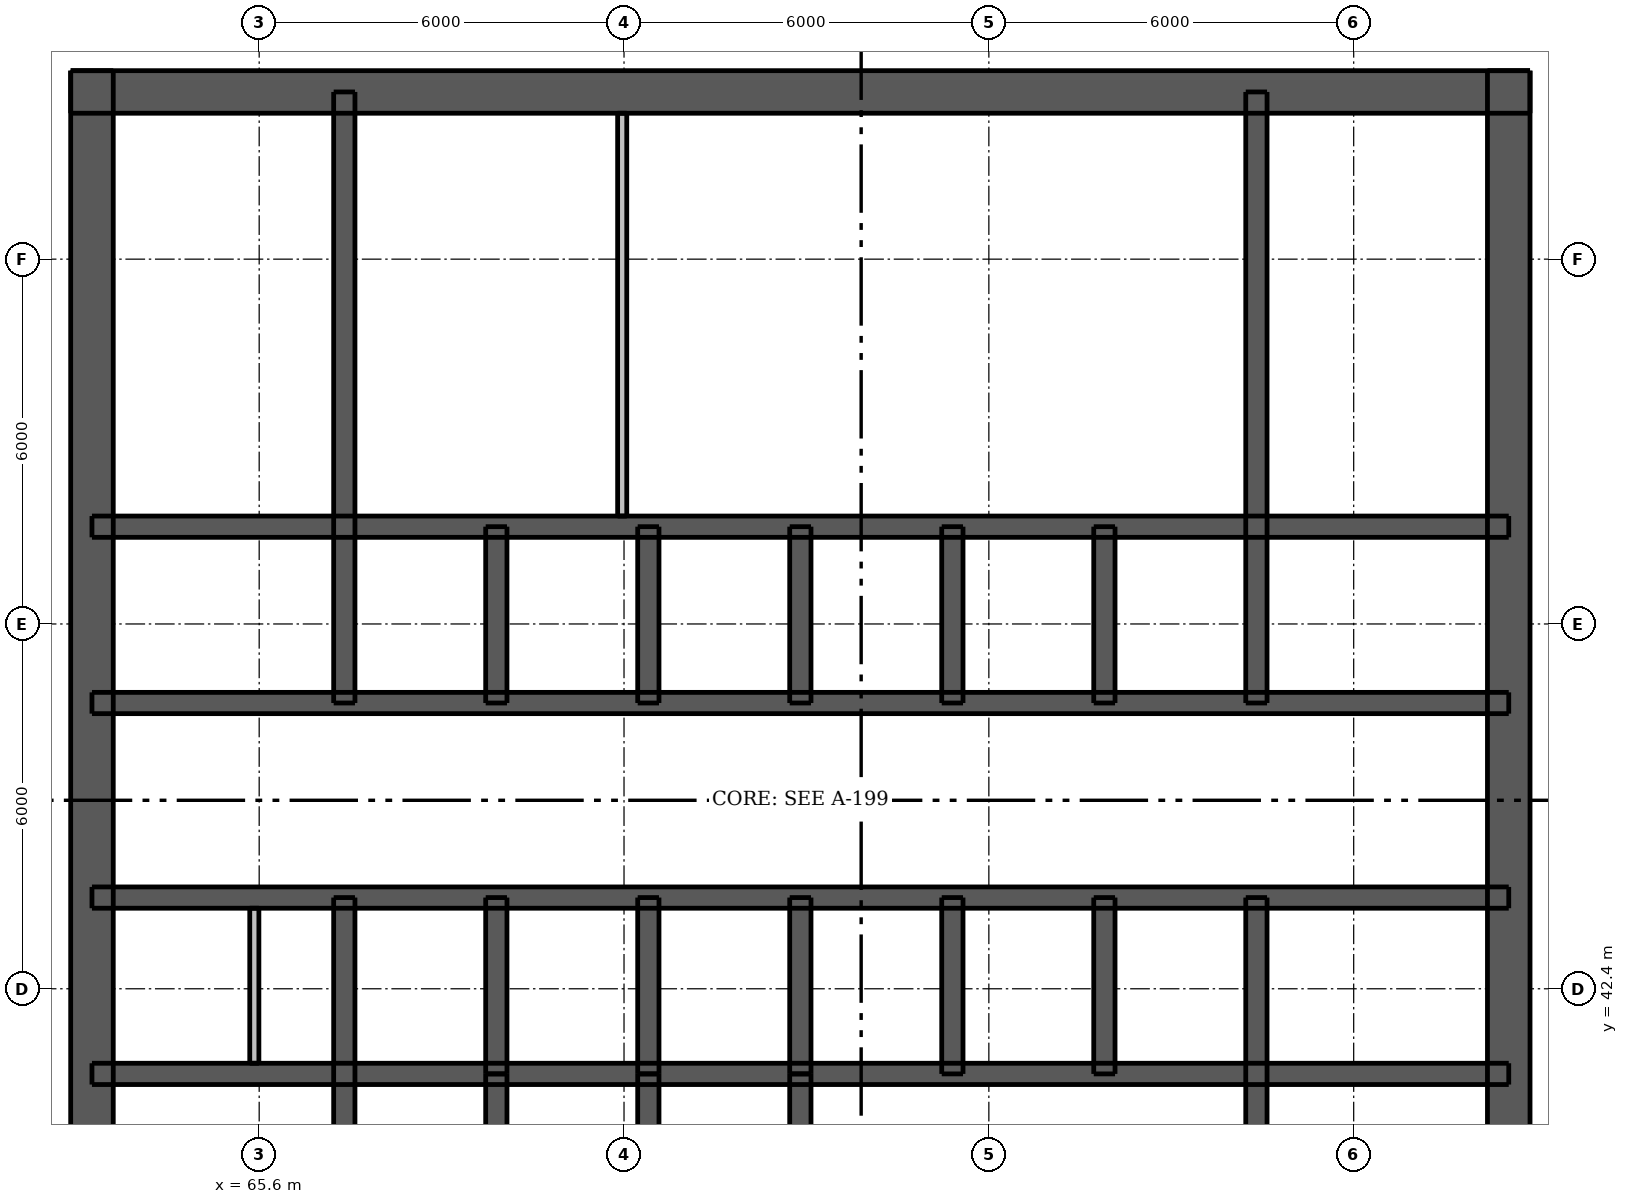
"""IFC4 building model, lengths in metres.
Left out: names, types, materials, properties, quantities, classifications, styles, units other than length and angle.
Written with IfcOpenShell. Run it as: python <this file> out.ifc"""

import sys

from ifc_helpers import new_model, si_unit, direction, frame, frame_2d, origin, place, context, subcontext, project, spatial, rectangle, extrude, element, fill, save


model = new_model("IFC4")
c1 = context("Model", 3, precision=1e-05, world=origin(), true_north=direction((0.0, 1.0)))
c2 = subcontext(c1, "Body", "Model", "MODEL_VIEW")
j1 = project(units=[si_unit("LENGTHUNIT", "METRE"), si_unit("PLANEANGLEUNIT", "RADIAN")], contexts=[c1])
p1 = place(None, origin())
s1 = spatial("IfcSite", under=j1, at=p1, CompositionType="ELEMENT")
p2 = place(p1, origin())
s2 = spatial("IfcBuilding", under=s1, at=p2, CompositionType="ELEMENT")
p3 = place(p2, frame((0.0, 0.0, 137.2)))
s3 = spatial("IfcBuildingStorey", under=s2, at=p3, CompositionType="ELEMENT", Elevation=137.2)
p4 = place(p3, frame((62.5, 57.15, 0.0), z_axis=(0.0, 0.0, 1.0), x_axis=(1.0, 0.0, 0.0)))
e1 = element("IfcWall", 1, at=p4, inside=s3, PredefinedType="SHEAR", context=c2, shape_type="SweptSolid", body=[
    extrude(rectangle(XDim=24.0, YDim=0.7, at=frame_2d((12.0, 0.0))), origin(), (0.0, 0.0, 1.0), 3.05),
])
p5 = place(p4, frame((20.938, 0.0, 0.0)))
e2 = element("IfcOpeningElement", 2, at=p5, cuts=e1, PredefinedType="OPENING", context=c2, shape_type="SweptSolid", body=[
    extrude(rectangle(XDim=1.1, YDim=2.1, at=frame_2d((0.55, 1.05))), frame((0.0, 0.36, 0.0), z_axis=(0.0, -1.0, 0.0), x_axis=(1.0, 0.0, 0.0)), (0.0, 0.0, 1.0), 0.72),
])
p6 = place(p4, frame((1.962, 0.0, 0.0)))
e3 = element("IfcOpeningElement", 3, at=p6, cuts=e1, PredefinedType="OPENING", context=c2, shape_type="SweptSolid", body=[
    extrude(rectangle(XDim=1.1, YDim=2.1, at=frame_2d((0.55, 1.05))), frame((0.0, 0.36, 0.0), z_axis=(0.0, -1.0, 0.0), x_axis=(1.0, 0.0, 0.0)), (0.0, 0.0, 1.0), 0.72),
])
p7 = place(p4, frame((6.423, 0.0, 0.0)))
e4 = element("IfcOpeningElement", 4, at=p7, cuts=e1, PredefinedType="OPENING", context=c2, shape_type="SweptSolid", body=[
    extrude(rectangle(XDim=0.9, YDim=2.1, at=frame_2d((0.45, 1.05))), frame((0.0, 0.36, 0.0), z_axis=(0.0, -1.0, 0.0), x_axis=(1.0, 0.0, 0.0)), (0.0, 0.0, 1.0), 0.72),
])
p8 = place(p4, frame((13.748, 0.0, 0.0)))
e5 = element("IfcOpeningElement", 5, at=p8, cuts=e1, PredefinedType="OPENING", context=c2, shape_type="SweptSolid", body=[
    extrude(rectangle(XDim=0.9, YDim=2.1, at=frame_2d((0.45, 1.05))), frame((0.0, 0.36, 0.0), z_axis=(0.0, -1.0, 0.0), x_axis=(1.0, 0.0, 0.0)), (0.0, 0.0, 1.0), 0.72),
])
p9 = place(p3, frame((62.85, 33.5, 0.0), z_axis=(0.0, 0.0, 1.0), x_axis=(0.0, 1.0, 0.0)))
e6 = element("IfcWall", 6, at=p9, inside=s3, PredefinedType="SHEAR", context=c2, shape_type="SweptSolid", body=[
    extrude(rectangle(XDim=24.0, YDim=0.7, at=frame_2d((12.0, 0.0))), origin(), (0.0, 0.0, 1.0), 3.05),
])
p10 = place(p9, frame((11.2, 0.0, 0.0)))
e7 = element("IfcOpeningElement", 7, at=p10, cuts=e6, PredefinedType="OPENING", context=c2, shape_type="SweptSolid", body=[
    extrude(rectangle(XDim=1.6, YDim=2.1, at=frame_2d((0.8, 1.05))), frame((0.0, 0.36, 0.0), z_axis=(0.0, -1.0, 0.0), x_axis=(1.0, 0.0, 0.0)), (0.0, 0.0, 1.0), 0.72),
])
p11 = place(p3, frame((86.15, 33.5, 0.0), z_axis=(0.0, 0.0, 1.0), x_axis=(0.0, 1.0, 0.0)))
e8 = element("IfcWall", 8, at=p11, inside=s3, PredefinedType="SHEAR", context=c2, shape_type="SweptSolid", body=[
    extrude(rectangle(XDim=24.0, YDim=0.7, at=frame_2d((12.0, 0.0))), origin(), (0.0, 0.0, 1.0), 3.05),
])
p12 = place(p11, frame((11.2, 0.0, 0.0)))
e9 = element("IfcOpeningElement", 9, at=p12, cuts=e8, PredefinedType="OPENING", context=c2, shape_type="SweptSolid", body=[
    extrude(rectangle(XDim=1.6, YDim=2.1, at=frame_2d((0.8, 1.05))), frame((0.0, 0.36, 0.0), z_axis=(0.0, -1.0, 0.0), x_axis=(1.0, 0.0, 0.0)), (0.0, 0.0, 1.0), 0.72),
])
p13 = place(p3, frame((62.85, 41.0, 0.0), z_axis=(0.0, 0.0, 1.0), x_axis=(1.0, 0.0, 0.0)))
e10 = element("IfcWall", 10, at=p13, inside=s3, PredefinedType="SHEAR", context=c2, shape_type="SweptSolid", body=[
    extrude(rectangle(XDim=23.3, YDim=0.35, at=frame_2d((11.65, 0.0))), origin(), (0.0, 0.0, 1.0), 3.05),
])
p14 = place(p3, frame((62.85, 43.9, 0.0), z_axis=(0.0, 0.0, 1.0), x_axis=(1.0, 0.0, 0.0)))
e11 = element("IfcWall", 11, at=p14, inside=s3, PredefinedType="SHEAR", context=c2, shape_type="SweptSolid", body=[
    extrude(rectangle(XDim=23.3, YDim=0.35, at=frame_2d((11.65, 0.0))), origin(), (0.0, 0.0, 1.0), 3.05),
])
p15 = place(p14, frame((1.06, 0.0, 0.0)))
e12 = element("IfcOpeningElement", 12, at=p15, cuts=e11, PredefinedType="OPENING", context=c2, shape_type="SweptSolid", body=[
    extrude(rectangle(XDim=0.9, YDim=2.1, at=frame_2d((0.45, 1.05))), frame((0.0, 0.185, 0.0), z_axis=(0.0, -1.0, 0.0), x_axis=(1.0, 0.0, 0.0)), (0.0, 0.0, 1.0), 0.37),
])
p16 = place(p14, frame((2.923, 0.0, 0.0)))
e13 = element("IfcOpeningElement", 13, at=p16, cuts=e11, PredefinedType="OPENING", context=c2, shape_type="SweptSolid", body=[
    extrude(rectangle(XDim=0.8, YDim=2.1, at=frame_2d((0.4, 1.05))), frame((0.0, 0.185, 0.0), z_axis=(0.0, -1.0, 0.0), x_axis=(1.0, 0.0, 0.0)), (0.0, 0.0, 1.0), 0.37),
])
p17 = place(p14, frame((20.688, 0.0, 0.0)))
e14 = element("IfcOpeningElement", 14, at=p17, cuts=e11, PredefinedType="OPENING", context=c2, shape_type="SweptSolid", body=[
    extrude(rectangle(XDim=0.9, YDim=2.1, at=frame_2d((0.45, 1.05))), frame((0.0, 0.185, 0.0), z_axis=(0.0, -1.0, 0.0), x_axis=(1.0, 0.0, 0.0)), (0.0, 0.0, 1.0), 0.37),
])
p18 = place(p14, frame((4.85, 0.0, 0.0)))
e15 = element("IfcOpeningElement", 15, at=p18, cuts=e11, PredefinedType="OPENING", context=c2, shape_type="SweptSolid", body=[
    extrude(rectangle(XDim=1.1, YDim=2.1, at=frame_2d((0.55, 1.05))), frame((0.0, 0.185, 0.0), z_axis=(0.0, -1.0, 0.0), x_axis=(1.0, 0.0, 0.0)), (0.0, 0.0, 1.0), 0.37),
])
p19 = place(p14, frame((7.35, 0.0, 0.0)))
e16 = element("IfcOpeningElement", 16, at=p19, cuts=e11, PredefinedType="OPENING", context=c2, shape_type="SweptSolid", body=[
    extrude(rectangle(XDim=1.1, YDim=2.1, at=frame_2d((0.55, 1.05))), frame((0.0, 0.185, 0.0), z_axis=(0.0, -1.0, 0.0), x_axis=(1.0, 0.0, 0.0)), (0.0, 0.0, 1.0), 0.37),
])
p20 = place(p14, frame((9.85, 0.0, 0.0)))
e17 = element("IfcOpeningElement", 17, at=p20, cuts=e11, PredefinedType="OPENING", context=c2, shape_type="SweptSolid", body=[
    extrude(rectangle(XDim=1.1, YDim=2.1, at=frame_2d((0.55, 1.05))), frame((0.0, 0.185, 0.0), z_axis=(0.0, -1.0, 0.0), x_axis=(1.0, 0.0, 0.0)), (0.0, 0.0, 1.0), 0.37),
])
p21 = place(p14, frame((12.35, 0.0, 0.0)))
e18 = element("IfcOpeningElement", 18, at=p21, cuts=e11, PredefinedType="OPENING", context=c2, shape_type="SweptSolid", body=[
    extrude(rectangle(XDim=1.1, YDim=2.1, at=frame_2d((0.55, 1.05))), frame((0.0, 0.185, 0.0), z_axis=(0.0, -1.0, 0.0), x_axis=(1.0, 0.0, 0.0)), (0.0, 0.0, 1.0), 0.37),
])
p22 = place(p14, frame((14.85, 0.0, 0.0)))
e19 = element("IfcOpeningElement", 19, at=p22, cuts=e11, PredefinedType="OPENING", context=c2, shape_type="SweptSolid", body=[
    extrude(rectangle(XDim=1.1, YDim=2.1, at=frame_2d((0.55, 1.05))), frame((0.0, 0.185, 0.0), z_axis=(0.0, -1.0, 0.0), x_axis=(1.0, 0.0, 0.0)), (0.0, 0.0, 1.0), 0.37),
])
p23 = place(p14, frame((17.35, 0.0, 0.0)))
e20 = element("IfcOpeningElement", 20, at=p23, cuts=e11, PredefinedType="OPENING", context=c2, shape_type="SweptSolid", body=[
    extrude(rectangle(XDim=1.1, YDim=2.1, at=frame_2d((0.55, 1.05))), frame((0.0, 0.185, 0.0), z_axis=(0.0, -1.0, 0.0), x_axis=(1.0, 0.0, 0.0)), (0.0, 0.0, 1.0), 0.37),
])
p24 = place(p3, frame((62.85, 47.1, 0.0), z_axis=(0.0, 0.0, 1.0), x_axis=(1.0, 0.0, 0.0)))
e21 = element("IfcWall", 21, at=p24, inside=s3, PredefinedType="SHEAR", context=c2, shape_type="SweptSolid", body=[
    extrude(rectangle(XDim=23.3, YDim=0.35, at=frame_2d((11.65, 0.0))), origin(), (0.0, 0.0, 1.0), 3.05),
])
p25 = place(p24, frame((1.712, 0.0, 0.0)))
e22 = element("IfcOpeningElement", 22, at=p25, cuts=e21, PredefinedType="OPENING", context=c2, shape_type="SweptSolid", body=[
    extrude(rectangle(XDim=0.9, YDim=2.1, at=frame_2d((0.45, 1.05))), frame((0.0, 0.185, 0.0), z_axis=(0.0, -1.0, 0.0), x_axis=(1.0, 0.0, 0.0)), (0.0, 0.0, 1.0), 0.37),
])
p26 = place(p24, frame((20.688, 0.0, 0.0)))
e23 = element("IfcOpeningElement", 23, at=p26, cuts=e21, PredefinedType="OPENING", context=c2, shape_type="SweptSolid", body=[
    extrude(rectangle(XDim=0.9, YDim=2.1, at=frame_2d((0.45, 1.05))), frame((0.0, 0.185, 0.0), z_axis=(0.0, -1.0, 0.0), x_axis=(1.0, 0.0, 0.0)), (0.0, 0.0, 1.0), 0.37),
])
p27 = place(p3, frame((62.85, 50.0, 0.0), z_axis=(0.0, 0.0, 1.0), x_axis=(1.0, 0.0, 0.0)))
e24 = element("IfcWall", 24, at=p27, inside=s3, PredefinedType="SHEAR", context=c2, shape_type="SweptSolid", body=[
    extrude(rectangle(XDim=23.3, YDim=0.35, at=frame_2d((11.65, 0.0))), origin(), (0.0, 0.0, 1.0), 3.05),
])
p28 = place(p3, frame((67.0, 33.85, 0.0), z_axis=(0.0, 0.0, 1.0), x_axis=(0.0, 1.0, 0.0)))
e25 = element("IfcWall", 25, at=p28, inside=s3, PredefinedType="SHEAR", context=c2, shape_type="SweptSolid", body=[
    extrude(rectangle(XDim=10.05, YDim=0.35, at=frame_2d((5.025, 0.0))), origin(), (0.0, 0.0, 1.0), 3.05),
])
p29 = place(p28, frame((0.55, 0.0, 0.0)))
e26 = element("IfcOpeningElement", 26, at=p29, cuts=e25, PredefinedType="OPENING", context=c2, shape_type="SweptSolid", body=[
    extrude(rectangle(XDim=1.1, YDim=2.1, at=frame_2d((0.55, 1.05))), frame((0.0, 0.185, 0.0), z_axis=(0.0, -1.0, 0.0), x_axis=(1.0, 0.0, 0.0)), (0.0, 0.0, 1.0), 0.37),
])
for number, where, z_axis, x_axis in (
    (27, (67.0, 47.1, 0.0), (0.0, 0.0, 1.0), (0.0, 1.0, 0.0)),
    (28, (82.0, 33.85, 0.0), (0.0, 0.0, 1.0), (0.0, 1.0, 0.0)),
    (29, (82.0, 47.1, 0.0), (0.0, 0.0, 1.0), (0.0, 1.0, 0.0)),
):
    element("IfcWall", number, at=place(p3, frame(where, z_axis=z_axis, x_axis=x_axis)), inside=s3, PredefinedType="SHEAR", context=c2, shape_type="SweptSolid", body=[
        extrude(rectangle(XDim=10.05, YDim=0.35, at=frame_2d((5.025, 0.0))), origin(), (0.0, 0.0, 1.0), 3.05),
    ])
for number, where, z_axis, x_axis in (
    (30, (69.5, 41.0, 0.0), (0.0, 0.0, 1.0), (0.0, 1.0, 0.0)),
    (31, (69.5, 47.1, 0.0), (0.0, 0.0, 1.0), (0.0, 1.0, 0.0)),
    (32, (72.0, 41.0, 0.0), (0.0, 0.0, 1.0), (0.0, 1.0, 0.0)),
    (33, (72.0, 47.1, 0.0), (0.0, 0.0, 1.0), (0.0, 1.0, 0.0)),
    (34, (74.5, 41.0, 0.0), (0.0, 0.0, 1.0), (0.0, 1.0, 0.0)),
    (35, (74.5, 47.1, 0.0), (0.0, 0.0, 1.0), (0.0, 1.0, 0.0)),
    (36, (77.0, 41.0, 0.0), (0.0, 0.0, 1.0), (0.0, 1.0, 0.0)),
    (37, (77.0, 47.1, 0.0), (0.0, 0.0, 1.0), (0.0, 1.0, 0.0)),
    (38, (79.5, 41.0, 0.0), (0.0, 0.0, 1.0), (0.0, 1.0, 0.0)),
    (39, (79.5, 47.1, 0.0), (0.0, 0.0, 1.0), (0.0, 1.0, 0.0)),
    (40, (69.5, 38.1, 0.0), (0.0, 0.0, 1.0), (0.0, 1.0, 0.0)),
    (41, (72.0, 38.1, 0.0), (0.0, 0.0, 1.0), (0.0, 1.0, 0.0)),
    (42, (74.5, 38.1, 0.0), (0.0, 0.0, 1.0), (0.0, 1.0, 0.0)),
):
    element("IfcWall", number, at=place(p3, frame(where, z_axis=z_axis, x_axis=x_axis)), inside=s3, PredefinedType="SHEAR", context=c2, shape_type="SweptSolid", body=[
        extrude(rectangle(XDim=2.9, YDim=0.35, at=frame_2d((1.45, 0.0))), origin(), (0.0, 0.0, 1.0), 3.05),
    ])
p30 = place(p3, frame((65.52, 41.175, 0.0), z_axis=(0.0, 0.0, 1.0), x_axis=(0.0, 1.0, 0.0)))
e43 = element("IfcWall", 43, at=p30, inside=s3, PredefinedType="PLUMBINGWALL", context=c2, shape_type="SweptSolid", body=[
    extrude(rectangle(XDim=2.55, YDim=0.15, at=frame_2d((1.275, 0.0))), origin(), (0.0, 0.0, 1.0), 3.05),
])
p31 = place(p3, frame((71.57, 50.175, 0.0), z_axis=(0.0, 0.0, 1.0), x_axis=(0.0, 1.0, 0.0)))
e44 = element("IfcWall", 44, at=p31, inside=s3, PredefinedType="PLUMBINGWALL", context=c2, shape_type="SweptSolid", body=[
    extrude(rectangle(XDim=6.625, YDim=0.15, at=frame_2d((3.312, 0.0))), origin(), (0.0, 0.0, 1.0), 3.05),
])
p32 = place(p5, origin())
e45 = element("IfcDoor", 45, at=p32, inside=s3, OperationType="SINGLE_SWING_RIGHT", PredefinedType="DOOR", context=c2, shape_type="SweptSolid", body=[
    extrude(rectangle(XDim=1.1, YDim=2.1, at=frame_2d((0.55, 1.05))), frame((0.0, -0.288, 0.0), z_axis=(0.0, -1.0, 0.0), x_axis=(1.0, 0.0, 0.0)), (0.0, 0.0, 1.0), 0.05),
])
fill(e2, e45)
p33 = place(p6, origin())
e46 = element("IfcDoor", 46, at=p33, inside=s3, OperationType="SINGLE_SWING_LEFT", PredefinedType="DOOR", context=c2, shape_type="SweptSolid", body=[
    extrude(rectangle(XDim=1.1, YDim=2.1, at=frame_2d((0.55, 1.05))), frame((0.0, -0.288, 0.0), z_axis=(0.0, -1.0, 0.0), x_axis=(1.0, 0.0, 0.0)), (0.0, 0.0, 1.0), 0.05),
])
fill(e3, e46)
p34 = place(p10, origin())
e47 = element("IfcDoor", 47, at=p34, inside=s3, OperationType="DOUBLE_DOOR_SINGLE_SWING", PredefinedType="DOOR", context=c2, shape_type="SweptSolid", body=[
    extrude(rectangle(XDim=1.6, YDim=2.1, at=frame_2d((0.8, 1.05))), frame((0.0, -0.288, 0.0), z_axis=(0.0, -1.0, 0.0), x_axis=(1.0, 0.0, 0.0)), (0.0, 0.0, 1.0), 0.05),
])
fill(e7, e47)
p35 = place(p12, origin())
e48 = element("IfcDoor", 48, at=p35, inside=s3, OperationType="DOUBLE_DOOR_SINGLE_SWING", PredefinedType="DOOR", context=c2, shape_type="SweptSolid", body=[
    extrude(rectangle(XDim=1.6, YDim=2.1, at=frame_2d((0.8, 1.05))), frame((0.0, 0.337, 0.0), z_axis=(0.0, -1.0, 0.0), x_axis=(1.0, 0.0, 0.0)), (0.0, 0.0, 1.0), 0.05),
])
fill(e9, e48)
p36 = place(p15, origin())
e49 = element("IfcDoor", 49, at=p36, inside=s3, OperationType="SINGLE_SWING_LEFT", PredefinedType="DOOR", context=c2, shape_type="SweptSolid", body=[
    extrude(rectangle(XDim=0.9, YDim=2.1, at=frame_2d((0.45, 1.05))), frame((0.0, -0.112, 0.0), z_axis=(0.0, -1.0, 0.0), x_axis=(1.0, 0.0, 0.0)), (0.0, 0.0, 1.0), 0.05),
])
fill(e12, e49)
p37 = place(p16, origin())
e50 = element("IfcDoor", 50, at=p37, inside=s3, OperationType="SINGLE_SWING_RIGHT", PredefinedType="DOOR", context=c2, shape_type="SweptSolid", body=[
    extrude(rectangle(XDim=0.8, YDim=2.1, at=frame_2d((0.4, 1.05))), frame((0.0, -0.112, 0.0), z_axis=(0.0, -1.0, 0.0), x_axis=(1.0, 0.0, 0.0)), (0.0, 0.0, 1.0), 0.05),
])
fill(e13, e50)
p38 = place(p17, origin())
e51 = element("IfcDoor", 51, at=p38, inside=s3, OperationType="SINGLE_SWING_LEFT", PredefinedType="DOOR", context=c2, shape_type="SweptSolid", body=[
    extrude(rectangle(XDim=0.9, YDim=2.1, at=frame_2d((0.45, 1.05))), frame((0.0, -0.112, 0.0), z_axis=(0.0, -1.0, 0.0), x_axis=(1.0, 0.0, 0.0)), (0.0, 0.0, 1.0), 0.05),
])
fill(e14, e51)
p39 = place(p25, origin())
e52 = element("IfcDoor", 52, at=p39, inside=s3, OperationType="SINGLE_SWING_LEFT", PredefinedType="DOOR", context=c2, shape_type="SweptSolid", body=[
    extrude(rectangle(XDim=0.9, YDim=2.1, at=frame_2d((0.45, 1.05))), frame((0.0, 0.163, 0.0), z_axis=(0.0, -1.0, 0.0), x_axis=(1.0, 0.0, 0.0)), (0.0, 0.0, 1.0), 0.05),
])
fill(e22, e52)
p40 = place(p26, origin())
e53 = element("IfcDoor", 53, at=p40, inside=s3, OperationType="SINGLE_SWING_LEFT", PredefinedType="DOOR", context=c2, shape_type="SweptSolid", body=[
    extrude(rectangle(XDim=0.9, YDim=2.1, at=frame_2d((0.45, 1.05))), frame((0.0, 0.163, 0.0), z_axis=(0.0, -1.0, 0.0), x_axis=(1.0, 0.0, 0.0)), (0.0, 0.0, 1.0), 0.05),
])
fill(e23, e53)
p41 = place(p7, origin())
e54 = element("IfcDoor", 54, at=p41, inside=s3, OperationType="SINGLE_SWING_RIGHT", PredefinedType="DOOR", context=c2, shape_type="SweptSolid", body=[
    extrude(rectangle(XDim=0.9, YDim=2.1, at=frame_2d((0.45, 1.05))), frame((0.0, -0.288, 0.0), z_axis=(0.0, -1.0, 0.0), x_axis=(1.0, 0.0, 0.0)), (0.0, 0.0, 1.0), 0.05),
])
fill(e4, e54)
p42 = place(p8, origin())
e55 = element("IfcDoor", 55, at=p42, inside=s3, OperationType="SINGLE_SWING_RIGHT", PredefinedType="DOOR", context=c2, shape_type="SweptSolid", body=[
    extrude(rectangle(XDim=0.9, YDim=2.1, at=frame_2d((0.45, 1.05))), frame((0.0, -0.288, 0.0), z_axis=(0.0, -1.0, 0.0), x_axis=(1.0, 0.0, 0.0)), (0.0, 0.0, 1.0), 0.05),
])
fill(e5, e55)
p43 = place(p18, origin())
e56 = element("IfcDoor", 56, at=p43, inside=s3, OperationType="DOUBLE_DOOR_SLIDING", PredefinedType="DOOR", context=c2, shape_type="SweptSolid", body=[
    extrude(rectangle(XDim=1.1, YDim=2.1, at=frame_2d((0.55, 1.05))), frame((0.0, 0.025, 0.0), z_axis=(0.0, -1.0, 0.0), x_axis=(1.0, 0.0, 0.0)), (0.0, 0.0, 1.0), 0.05),
])
fill(e15, e56)
p44 = place(p19, origin())
e57 = element("IfcDoor", 57, at=p44, inside=s3, OperationType="DOUBLE_DOOR_SLIDING", PredefinedType="DOOR", context=c2, shape_type="SweptSolid", body=[
    extrude(rectangle(XDim=1.1, YDim=2.1, at=frame_2d((0.55, 1.05))), frame((0.0, 0.025, 0.0), z_axis=(0.0, -1.0, 0.0), x_axis=(1.0, 0.0, 0.0)), (0.0, 0.0, 1.0), 0.05),
])
fill(e16, e57)
p45 = place(p20, origin())
e58 = element("IfcDoor", 58, at=p45, inside=s3, OperationType="DOUBLE_DOOR_SLIDING", PredefinedType="DOOR", context=c2, shape_type="SweptSolid", body=[
    extrude(rectangle(XDim=1.1, YDim=2.1, at=frame_2d((0.55, 1.05))), frame((0.0, 0.025, 0.0), z_axis=(0.0, -1.0, 0.0), x_axis=(1.0, 0.0, 0.0)), (0.0, 0.0, 1.0), 0.05),
])
fill(e17, e58)
p46 = place(p21, origin())
e59 = element("IfcDoor", 59, at=p46, inside=s3, OperationType="DOUBLE_DOOR_SLIDING", PredefinedType="DOOR", context=c2, shape_type="SweptSolid", body=[
    extrude(rectangle(XDim=1.1, YDim=2.1, at=frame_2d((0.55, 1.05))), frame((0.0, 0.025, 0.0), z_axis=(0.0, -1.0, 0.0), x_axis=(1.0, 0.0, 0.0)), (0.0, 0.0, 1.0), 0.05),
])
fill(e18, e59)
p47 = place(p22, origin())
e60 = element("IfcDoor", 60, at=p47, inside=s3, OperationType="DOUBLE_DOOR_SLIDING", PredefinedType="DOOR", context=c2, shape_type="SweptSolid", body=[
    extrude(rectangle(XDim=1.1, YDim=2.1, at=frame_2d((0.55, 1.05))), frame((0.0, 0.025, 0.0), z_axis=(0.0, -1.0, 0.0), x_axis=(1.0, 0.0, 0.0)), (0.0, 0.0, 1.0), 0.05),
])
fill(e19, e60)
p48 = place(p23, origin())
e61 = element("IfcDoor", 61, at=p48, inside=s3, OperationType="DOUBLE_DOOR_SLIDING", PredefinedType="DOOR", context=c2, shape_type="SweptSolid", body=[
    extrude(rectangle(XDim=1.1, YDim=2.1, at=frame_2d((0.55, 1.05))), frame((0.0, 0.025, 0.0), z_axis=(0.0, -1.0, 0.0), x_axis=(1.0, 0.0, 0.0)), (0.0, 0.0, 1.0), 0.05),
])
fill(e20, e61)
save(model, sys.argv[1])
